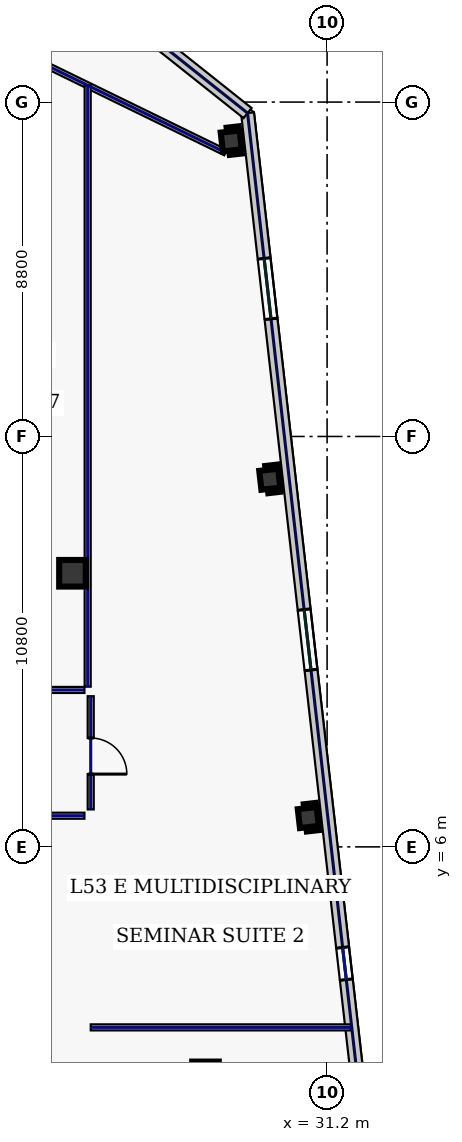
"""IFC4 building model, lengths in metres.
Left out: names, types, materials, properties, quantities, classifications, styles, units other than length and angle.
Written with IfcOpenShell. Run it as: python <this file> out.ifc"""

import sys

from ifc_helpers import new_model, si_unit, direction, frame, frame_2d, origin, origin_2d, place, context, subcontext, project, spatial, rectangle, hollow_rectangle, extrude, element, fill, save


model = new_model("IFC4")
c1 = context("Model", 3, precision=1e-05, world=origin(), true_north=direction((0.0, 1.0)))
c2 = subcontext(c1, "Body", "Model", "MODEL_VIEW")
j1 = project(units=[si_unit("LENGTHUNIT", "METRE"), si_unit("PLANEANGLEUNIT", "RADIAN")], contexts=[c1])
p1 = place(None, origin())
s1 = spatial("IfcSite", under=j1, at=p1, CompositionType="ELEMENT")
p2 = place(p1, origin())
s2 = spatial("IfcBuilding", under=s1, at=p2, CompositionType="ELEMENT")
p3 = place(p2, frame((0.0, 0.0, 230.2)))
s3 = spatial("IfcBuildingStorey", under=s2, at=p3, CompositionType="ELEMENT", Elevation=230.2)
for number, where, z_axis, x_axis in (
    (1, (24.5, 13.2, 0.0), (0.0, 0.0, 1.0), (1.0, 0.0, 0.0)),
    (2, (28.0, 0.0, 0.0), (0.0, 0.0, 1.0), (1.0, 0.0, 0.0)),
):
    element("IfcColumn", number, at=place(p3, frame(where, z_axis=z_axis, x_axis=x_axis)), inside=s3, PredefinedType="COLUMN", context=c2, shape_type="SweptSolid", body=[
        extrude(hollow_rectangle(XDim=0.7, YDim=0.7, WallThickness=0.032, at=origin_2d()), origin(), (0.0, 0.0, 1.0), 3.74),
    ])
for number, where, z_axis, x_axis in (
    (3, (30.706, 6.772, 0.0), (0.0, 0.0, 1.0), (0.994, 0.113, 0.0)),
    (4, (29.691, 15.674, 0.0), (0.0, 0.0, 1.0), (0.994, 0.113, 0.0)),
    (5, (28.677, 24.577, 0.0), (0.0, 0.0, 1.0), (0.994, 0.113, 0.0)),
):
    element("IfcColumn", number, at=place(p3, frame(where, z_axis=z_axis, x_axis=x_axis)), inside=s3, PredefinedType="COLUMN", context=c2, shape_type="SweptSolid", body=[
        extrude(hollow_rectangle(XDim=0.5, YDim=0.5, WallThickness=0.025, at=origin_2d()), origin(), (0.0, 0.0, 1.0), 3.74),
    ])
p4 = place(p3, frame((33.318, -11.651, 0.0), z_axis=(0.0, 0.0, 1.0), x_axis=(-0.11320360501, 0.9935718111, 0.0)))
e6 = element("IfcWall", 6, at=p4, inside=s3, PredefinedType="STANDARD", context=c2, shape_type="SweptSolid", body=[
    extrude(rectangle(XDim=37.2, YDim=0.34, at=frame_2d((18.6, 0.0))), origin(), (0.0, 0.0, 1.0), 3.74),
])
p5 = place(p4, frame((3.85, 0.0, 0.58)))
e7 = element("IfcOpeningElement", 7, at=p5, cuts=e6, PredefinedType="OPENING", context=c2, shape_type="SweptSolid", body=[
    extrude(rectangle(XDim=1.6, YDim=2.3, at=frame_2d((0.8, 1.15))), frame((0.0, 0.18, 0.0), z_axis=(0.0, -1.0, 0.0), x_axis=(1.0, 0.0, 0.0)), (0.0, 0.0, 1.0), 0.36),
])
p6 = place(p4, frame((14.25, 0.0, 0.75)))
e8 = element("IfcOpeningElement", 8, at=p6, cuts=e6, PredefinedType="OPENING", context=c2, shape_type="SweptSolid", body=[
    extrude(rectangle(XDim=0.85, YDim=1.85, at=frame_2d((0.425, 0.925))), frame((0.0, 0.18, 0.0), z_axis=(0.0, -1.0, 0.0), x_axis=(1.0, 0.0, 0.0)), (0.0, 0.0, 1.0), 0.36),
])
p7 = place(p4, frame((22.45, 0.0, 0.58)))
e9 = element("IfcOpeningElement", 9, at=p7, cuts=e6, PredefinedType="OPENING", context=c2, shape_type="SweptSolid", body=[
    extrude(rectangle(XDim=1.6, YDim=2.3, at=frame_2d((0.8, 1.15))), frame((0.0, 0.18, 0.0), z_axis=(0.0, -1.0, 0.0), x_axis=(1.0, 0.0, 0.0)), (0.0, 0.0, 1.0), 0.36),
])
p8 = place(p4, frame((31.75, 0.0, 0.58)))
e10 = element("IfcOpeningElement", 10, at=p8, cuts=e6, PredefinedType="OPENING", context=c2, shape_type="SweptSolid", body=[
    extrude(rectangle(XDim=1.6, YDim=2.3, at=frame_2d((0.8, 1.15))), frame((0.0, 0.18, 0.0), z_axis=(0.0, -1.0, 0.0), x_axis=(1.0, 0.0, 0.0)), (0.0, 0.0, 1.0), 0.36),
])
p9 = place(p3, frame((29.107, 25.31, 0.0), z_axis=(0.0, 0.0, 1.0), x_axis=(-0.78259733853, 0.62252823689, 0.0)))
e11 = element("IfcWall", 11, at=p9, inside=s3, PredefinedType="STANDARD", context=c2, shape_type="SweptSolid", body=[
    extrude(rectangle(XDim=6.548, YDim=0.34, at=frame_2d((3.274, 0.0))), origin(), (0.0, 0.0, 1.0), 3.74),
])
p10 = place(p3, frame((28.528, 24.271, 0.0), z_axis=(0.0, 0.0, 1.0), x_axis=(-0.898820692789, 0.438316509173, 0.0)))
e12 = element("IfcWall", 12, at=p10, inside=s3, PredefinedType="PARTITIONING", context=c2, shape_type="SweptSolid", body=[
    extrude(rectangle(XDim=6.107, YDim=0.16, at=frame_2d((3.053, 0.0))), origin(), (0.0, 0.0, 1.0), 3.74),
])
p11 = place(p3, frame((-24.815, 10.13, 0.0), z_axis=(0.0, 0.0, 1.0), x_axis=(1.0, 0.0, 0.0)))
e13 = element("IfcWall", 13, at=p11, inside=s3, PredefinedType="PARTITIONING", context=c2, shape_type="SweptSolid", body=[
    extrude(rectangle(XDim=49.63, YDim=0.16, at=frame_2d((24.815, 0.0))), origin(), (0.0, 0.0, 1.0), 3.74),
])
p12 = place(p11, frame((2.044, 0.0, 0.0)))
e14 = element("IfcOpeningElement", 14, at=p12, cuts=e13, PredefinedType="OPENING", context=c2, shape_type="SweptSolid", body=[
    extrude(rectangle(XDim=0.95, YDim=2.2, at=frame_2d((0.475, 1.1))), frame((0.0, 0.09, 0.0), z_axis=(0.0, -1.0, 0.0), x_axis=(1.0, 0.0, 0.0)), (0.0, 0.0, 1.0), 0.18),
])
p13 = place(p11, frame((6.72, 0.0, 0.0)))
e15 = element("IfcOpeningElement", 15, at=p13, cuts=e13, PredefinedType="OPENING", context=c2, shape_type="SweptSolid", body=[
    extrude(rectangle(XDim=1.05, YDim=2.2, at=frame_2d((0.525, 1.1))), frame((0.0, 0.09, 0.0), z_axis=(0.0, -1.0, 0.0), x_axis=(1.0, 0.0, 0.0)), (0.0, 0.0, 1.0), 0.18),
])
p14 = place(p11, frame((12.945, 0.0, 0.0)))
e16 = element("IfcOpeningElement", 16, at=p14, cuts=e13, PredefinedType="OPENING", context=c2, shape_type="SweptSolid", body=[
    extrude(rectangle(XDim=0.95, YDim=2.2, at=frame_2d((0.475, 1.1))), frame((0.0, 0.09, 0.0), z_axis=(0.0, -1.0, 0.0), x_axis=(1.0, 0.0, 0.0)), (0.0, 0.0, 1.0), 0.18),
])
p15 = place(p11, frame((20.825, 0.0, 0.0)))
e17 = element("IfcOpeningElement", 17, at=p15, cuts=e13, PredefinedType="OPENING", context=c2, shape_type="SweptSolid", body=[
    extrude(rectangle(XDim=0.95, YDim=2.2, at=frame_2d((0.475, 1.1))), frame((0.0, 0.09, 0.0), z_axis=(0.0, -1.0, 0.0), x_axis=(1.0, 0.0, 0.0)), (0.0, 0.0, 1.0), 0.18),
])
p16 = place(p11, frame((29.325, 0.0, 0.0)))
e18 = element("IfcOpeningElement", 18, at=p16, cuts=e13, PredefinedType="OPENING", context=c2, shape_type="SweptSolid", body=[
    extrude(rectangle(XDim=0.95, YDim=2.2, at=frame_2d((0.475, 1.1))), frame((0.0, 0.09, 0.0), z_axis=(0.0, -1.0, 0.0), x_axis=(1.0, 0.0, 0.0)), (0.0, 0.0, 1.0), 0.18),
])
p17 = place(p11, frame((37.725, 0.0, 0.0)))
e19 = element("IfcOpeningElement", 19, at=p17, cuts=e13, PredefinedType="OPENING", context=c2, shape_type="SweptSolid", body=[
    extrude(rectangle(XDim=0.95, YDim=2.2, at=frame_2d((0.475, 1.1))), frame((0.0, 0.09, 0.0), z_axis=(0.0, -1.0, 0.0), x_axis=(1.0, 0.0, 0.0)), (0.0, 0.0, 1.0), 0.18),
])
p18 = place(p11, frame((45.381, 0.0, 0.0)))
e20 = element("IfcOpeningElement", 20, at=p18, cuts=e13, PredefinedType="OPENING", context=c2, shape_type="SweptSolid", body=[
    extrude(rectangle(XDim=1.05, YDim=2.2, at=frame_2d((0.525, 1.1))), frame((0.0, 0.09, 0.0), z_axis=(0.0, -1.0, 0.0), x_axis=(1.0, 0.0, 0.0)), (0.0, 0.0, 1.0), 0.18),
])
p19 = place(p3, frame((24.98, 9.965, 0.0), z_axis=(0.0, 0.0, 1.0), x_axis=(0.0, -1.0, 0.0)))
e21 = element("IfcWall", 21, at=p19, inside=s3, PredefinedType="PARTITIONING", context=c2, shape_type="SweptSolid", body=[
    extrude(rectangle(XDim=2.98, YDim=0.16, at=frame_2d((1.49, 0.0))), origin(), (0.0, 0.0, 1.0), 3.74),
])
p20 = place(p19, frame((1.1, 0.0, 0.0)))
e22 = element("IfcOpeningElement", 22, at=p20, cuts=e21, PredefinedType="OPENING", context=c2, shape_type="SweptSolid", body=[
    extrude(rectangle(XDim=0.95, YDim=2.2, at=frame_2d((0.475, 1.1))), frame((0.0, 0.09, 0.0), z_axis=(0.0, -1.0, 0.0), x_axis=(1.0, 0.0, 0.0)), (0.0, 0.0, 1.0), 0.18),
])
p21 = place(p3, frame((24.815, 6.82, 0.0), z_axis=(0.0, 0.0, 1.0), x_axis=(-1.0, 0.0, 0.0)))
e23 = element("IfcWall", 23, at=p21, inside=s3, PredefinedType="PARTITIONING", context=c2, shape_type="SweptSolid", body=[
    extrude(rectangle(XDim=14.185, YDim=0.16, at=frame_2d((7.093, 0.0))), origin(), (0.0, 0.0, 1.0), 3.74),
])
p22 = place(p3, frame((24.9, 10.215, 0.0), z_axis=(0.0, 0.0, 1.0), x_axis=(0.0, 1.0, 0.0)))
e24 = element("IfcWall", 24, at=p22, inside=s3, PredefinedType="PARTITIONING", context=c2, shape_type="SweptSolid", body=[
    extrude(rectangle(XDim=15.829, YDim=0.16, at=frame_2d((7.915, 0.0))), origin(), (0.0, 0.0, 1.0), 3.74),
])
p23 = place(p3, frame((24.98, 1.25, 0.0), z_axis=(0.0, 0.0, 1.0), x_axis=(1.0, 0.0, 0.0)))
e25 = element("IfcWall", 25, at=p23, inside=s3, PredefinedType="PARTITIONING", context=c2, shape_type="SweptSolid", body=[
    extrude(rectangle(XDim=6.848, YDim=0.16, at=frame_2d((3.424, 0.0))), origin(), (0.0, 0.0, 1.0), 3.74),
])
p24 = place(p6, origin())
e26 = element("IfcWindow", 26, at=p24, inside=s3, PartitioningType="SINGLE_PANEL", PredefinedType="WINDOW", context=c2, shape_type="SweptSolid", body=[
    extrude(rectangle(XDim=0.85, YDim=1.85, at=frame_2d((0.425, 0.925))), frame((0.0, 0.03, 0.0), z_axis=(0.0, -1.0, 0.0), x_axis=(1.0, 0.0, 0.0)), (0.0, 0.0, 1.0), 0.06),
])
fill(e8, e26)
p25 = place(p7, origin())
e27 = element("IfcWindow", 27, at=p25, inside=s3, PartitioningType="SINGLE_PANEL", PredefinedType="WINDOW", context=c2, shape_type="SweptSolid", body=[
    extrude(rectangle(XDim=1.6, YDim=2.3, at=frame_2d((0.8, 1.15))), frame((0.0, 0.03, 0.0), z_axis=(0.0, -1.0, 0.0), x_axis=(1.0, 0.0, 0.0)), (0.0, 0.0, 1.0), 0.06),
])
fill(e9, e27)
p26 = place(p8, origin())
e28 = element("IfcWindow", 28, at=p26, inside=s3, PartitioningType="SINGLE_PANEL", PredefinedType="WINDOW", context=c2, shape_type="SweptSolid", body=[
    extrude(rectangle(XDim=1.6, YDim=2.3, at=frame_2d((0.8, 1.15))), frame((0.0, 0.03, 0.0), z_axis=(0.0, -1.0, 0.0), x_axis=(1.0, 0.0, 0.0)), (0.0, 0.0, 1.0), 0.06),
])
fill(e10, e28)
p27 = place(p20, origin())
e29 = element("IfcDoor", 29, at=p27, inside=s3, OperationType="SINGLE_SWING_RIGHT", PredefinedType="DOOR", context=c2, shape_type="SweptSolid", body=[
    extrude(rectangle(XDim=0.95, YDim=2.2, at=frame_2d((0.475, 1.1))), frame((0.0, 0.025, 0.0), z_axis=(0.0, -1.0, 0.0), x_axis=(1.0, 0.0, 0.0)), (0.0, 0.0, 1.0), 0.05),
])
fill(e22, e29)
save(model, sys.argv[1])
